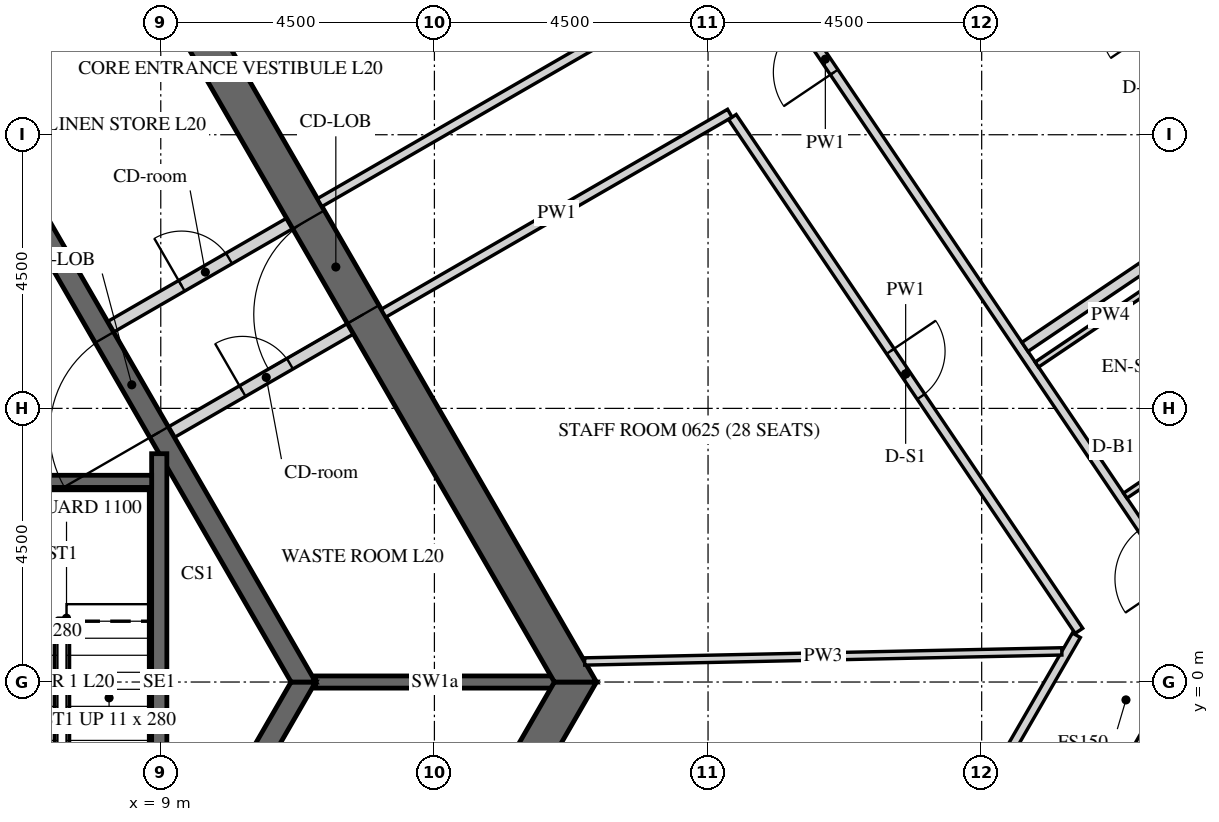
"""IFC4 building model, lengths in metres.
Left out: names, types, materials, properties, quantities, classifications, styles, units other than length and angle.
Written with IfcOpenShell. Run it as: python <this file> out.ifc"""

import sys

from ifc_helpers import new_model, si_unit, direction, frame, frame_2d, origin, place, context, subcontext, project, spatial, polyline, rectangle, outline, extrude, element, fill, save


model = new_model("IFC4")
c1 = context("Model", 3, precision=1e-05, world=origin(), true_north=direction((0.0, 1.0)))
c2 = subcontext(c1, "Body", "Model", "MODEL_VIEW")
j1 = project(units=[si_unit("LENGTHUNIT", "METRE"), si_unit("PLANEANGLEUNIT", "RADIAN")], contexts=[c1])
p1 = place(None, origin())
s1 = spatial("IfcSite", under=j1, at=p1, CompositionType="ELEMENT")
p2 = place(p1, origin())
s2 = spatial("IfcBuilding", under=s1, at=p2, CompositionType="ELEMENT")
p3 = place(p2, frame((0.0, 0.0, 92.1)))
s3 = spatial("IfcBuildingStorey", under=s2, at=p3, CompositionType="ELEMENT", Elevation=92.1)
p4 = place(p3, frame((18.83, -26.835, -0.15), z_axis=(0.0, 0.0, 1.0), x_axis=(0.500003800416, 0.866023209602, 0.0)))
e1 = element("IfcWall", 1, at=p4, inside=s3, PredefinedType="SOLIDWALL", context=c2, shape_type="SweptSolid", body=[
    extrude(outline(polyline([(-0.022, -0.275), (30.097, -0.275), (30.045, 0.275), (0.022, 0.275), (-0.022, -0.275)])), origin(), (0.0, 0.0, 1.0), 3.9),
])
p5 = place(p4, frame((1.236, 0.0, 1.05)))
e2 = element("IfcOpeningElement", 2, at=p5, cuts=e1, PredefinedType="OPENING", context=c2, shape_type="SweptSolid", body=[
    extrude(rectangle(XDim=2.4, YDim=2.4, at=frame_2d((1.2, 1.2))), frame((0.0, 0.285, 0.0), z_axis=(0.0, -1.0, 0.0), x_axis=(1.0, 0.0, 0.0)), (0.0, 0.0, 1.0), 0.57),
])
p6 = place(p4, frame((4.835, 0.0, 1.05)))
e3 = element("IfcOpeningElement", 3, at=p6, cuts=e1, PredefinedType="OPENING", context=c2, shape_type="SweptSolid", body=[
    extrude(rectangle(XDim=2.4, YDim=2.4, at=frame_2d((1.2, 1.2))), frame((0.0, 0.285, 0.0), z_axis=(0.0, -1.0, 0.0), x_axis=(1.0, 0.0, 0.0)), (0.0, 0.0, 1.0), 0.57),
])
p7 = place(p4, frame((8.436, 0.0, 1.05)))
e4 = element("IfcOpeningElement", 4, at=p7, cuts=e1, PredefinedType="OPENING", context=c2, shape_type="SweptSolid", body=[
    extrude(rectangle(XDim=2.4, YDim=2.4, at=frame_2d((1.2, 1.2))), frame((0.0, 0.285, 0.0), z_axis=(0.0, -1.0, 0.0), x_axis=(1.0, 0.0, 0.0)), (0.0, 0.0, 1.0), 0.57),
])
p8 = place(p4, frame((12.035, 0.0, 1.05)))
e5 = element("IfcOpeningElement", 5, at=p8, cuts=e1, PredefinedType="OPENING", context=c2, shape_type="SweptSolid", body=[
    extrude(rectangle(XDim=2.4, YDim=2.4, at=frame_2d((1.2, 1.2))), frame((0.0, 0.285, 0.0), z_axis=(0.0, -1.0, 0.0), x_axis=(1.0, 0.0, 0.0)), (0.0, 0.0, 1.0), 0.57),
])
p9 = place(p4, frame((15.635, 0.0, 1.05)))
e6 = element("IfcOpeningElement", 6, at=p9, cuts=e1, PredefinedType="OPENING", context=c2, shape_type="SweptSolid", body=[
    extrude(rectangle(XDim=2.4, YDim=2.4, at=frame_2d((1.2, 1.2))), frame((0.0, 0.285, 0.0), z_axis=(0.0, -1.0, 0.0), x_axis=(1.0, 0.0, 0.0)), (0.0, 0.0, 1.0), 0.57),
])
p10 = place(p4, frame((19.236, 0.0, 1.05)))
e7 = element("IfcOpeningElement", 7, at=p10, cuts=e1, PredefinedType="OPENING", context=c2, shape_type="SweptSolid", body=[
    extrude(rectangle(XDim=2.4, YDim=2.4, at=frame_2d((1.2, 1.2))), frame((0.0, 0.285, 0.0), z_axis=(0.0, -1.0, 0.0), x_axis=(1.0, 0.0, 0.0)), (0.0, 0.0, 1.0), 0.57),
])
p11 = place(p4, frame((22.835, 0.0, 1.05)))
e8 = element("IfcOpeningElement", 8, at=p11, cuts=e1, PredefinedType="OPENING", context=c2, shape_type="SweptSolid", body=[
    extrude(rectangle(XDim=2.4, YDim=2.4, at=frame_2d((1.2, 1.2))), frame((0.0, 0.285, 0.0), z_axis=(0.0, -1.0, 0.0), x_axis=(1.0, 0.0, 0.0)), (0.0, 0.0, 1.0), 0.57),
])
p12 = place(p4, frame((26.436, 0.0, 1.05)))
e9 = element("IfcOpeningElement", 9, at=p12, cuts=e1, PredefinedType="OPENING", context=c2, shape_type="SweptSolid", body=[
    extrude(rectangle(XDim=2.4, YDim=2.4, at=frame_2d((1.2, 1.2))), frame((0.0, 0.285, 0.0), z_axis=(0.0, -1.0, 0.0), x_axis=(1.0, 0.0, 0.0)), (0.0, 0.0, 1.0), 0.57),
])
p13 = place(p3, frame((33.728, 3.153, -0.15), z_axis=(0.0, 0.0, 1.0), x_axis=(-0.559192411416, 0.82903790445, 0.0)))
e10 = element("IfcWall", 10, at=p13, inside=s3, PredefinedType="SOLIDWALL", context=c2, shape_type="SweptSolid", body=[
    extrude(outline(polyline([(-0.026, -0.275), (30.093, -0.275), (30.048, 0.275), (0.026, 0.275), (-0.026, -0.275)])), origin(), (0.0, 0.0, 1.0), 3.9),
])
p14 = place(p13, frame((1.236, 0.0, 1.05)))
e11 = element("IfcOpeningElement", 11, at=p14, cuts=e10, PredefinedType="OPENING", context=c2, shape_type="SweptSolid", body=[
    extrude(rectangle(XDim=2.4, YDim=2.4, at=frame_2d((1.2, 1.2))), frame((0.0, 0.285, 0.0), z_axis=(0.0, -1.0, 0.0), x_axis=(1.0, 0.0, 0.0)), (0.0, 0.0, 1.0), 0.57),
])
p15 = place(p13, frame((4.835, 0.0, 1.05)))
e12 = element("IfcOpeningElement", 12, at=p15, cuts=e10, PredefinedType="OPENING", context=c2, shape_type="SweptSolid", body=[
    extrude(rectangle(XDim=2.4, YDim=2.4, at=frame_2d((1.2, 1.2))), frame((0.0, 0.285, 0.0), z_axis=(0.0, -1.0, 0.0), x_axis=(1.0, 0.0, 0.0)), (0.0, 0.0, 1.0), 0.57),
])
p16 = place(p13, frame((8.436, 0.0, 1.05)))
e13 = element("IfcOpeningElement", 13, at=p16, cuts=e10, PredefinedType="OPENING", context=c2, shape_type="SweptSolid", body=[
    extrude(rectangle(XDim=2.4, YDim=2.4, at=frame_2d((1.2, 1.2))), frame((0.0, 0.285, 0.0), z_axis=(0.0, -1.0, 0.0), x_axis=(1.0, 0.0, 0.0)), (0.0, 0.0, 1.0), 0.57),
])
p17 = place(p13, frame((12.035, 0.0, 1.05)))
e14 = element("IfcOpeningElement", 14, at=p17, cuts=e10, PredefinedType="OPENING", context=c2, shape_type="SweptSolid", body=[
    extrude(rectangle(XDim=2.4, YDim=2.4, at=frame_2d((1.2, 1.2))), frame((0.0, 0.285, 0.0), z_axis=(0.0, -1.0, 0.0), x_axis=(1.0, 0.0, 0.0)), (0.0, 0.0, 1.0), 0.57),
])
p18 = place(p13, frame((15.635, 0.0, 1.05)))
e15 = element("IfcOpeningElement", 15, at=p18, cuts=e10, PredefinedType="OPENING", context=c2, shape_type="SweptSolid", body=[
    extrude(rectangle(XDim=2.4, YDim=2.4, at=frame_2d((1.2, 1.2))), frame((0.0, 0.285, 0.0), z_axis=(0.0, -1.0, 0.0), x_axis=(1.0, 0.0, 0.0)), (0.0, 0.0, 1.0), 0.57),
])
p19 = place(p13, frame((19.236, 0.0, 1.05)))
e16 = element("IfcOpeningElement", 16, at=p19, cuts=e10, PredefinedType="OPENING", context=c2, shape_type="SweptSolid", body=[
    extrude(rectangle(XDim=2.4, YDim=2.4, at=frame_2d((1.2, 1.2))), frame((0.0, 0.285, 0.0), z_axis=(0.0, -1.0, 0.0), x_axis=(1.0, 0.0, 0.0)), (0.0, 0.0, 1.0), 0.57),
])
p20 = place(p13, frame((22.835, 0.0, 1.05)))
e17 = element("IfcOpeningElement", 17, at=p20, cuts=e10, PredefinedType="OPENING", context=c2, shape_type="SweptSolid", body=[
    extrude(rectangle(XDim=2.4, YDim=2.4, at=frame_2d((1.2, 1.2))), frame((0.0, 0.285, 0.0), z_axis=(0.0, -1.0, 0.0), x_axis=(1.0, 0.0, 0.0)), (0.0, 0.0, 1.0), 0.57),
])
p21 = place(p13, frame((26.436, 0.0, 1.05)))
e18 = element("IfcOpeningElement", 18, at=p21, cuts=e10, PredefinedType="OPENING", context=c2, shape_type="SweptSolid", body=[
    extrude(rectangle(XDim=2.4, YDim=2.4, at=frame_2d((1.2, 1.2))), frame((0.0, 0.285, 0.0), z_axis=(0.0, -1.0, 0.0), x_axis=(1.0, 0.0, 0.0)), (0.0, 0.0, 1.0), 0.57),
])
p22 = place(p3, frame((7.91, -13.7, -0.15), z_axis=(0.0, 0.0, 1.0), x_axis=(0.499999880136, 0.866025472988, 0.0)))
e19 = element("IfcWall", 19, at=p22, inside=s3, PredefinedType="SHEAR", context=c2, shape_type="SweptSolid", body=[
    extrude(outline(polyline([(-0.173, -0.3), (15.993, -0.3), (15.646, 0.3), (0.173, 0.3), (-0.173, -0.3)])), origin(), (0.0, 0.0, 1.0), 3.9),
])
p23 = place(p22, frame((7.039, 0.0, 0.15)))
e20 = element("IfcOpeningElement", 20, at=p23, cuts=e19, PredefinedType="OPENING", context=c2, shape_type="SweptSolid", body=[
    extrude(rectangle(XDim=1.8, YDim=2.4, at=frame_2d((0.9, 1.2))), frame((0.0, 0.31, 0.0), z_axis=(0.0, -1.0, 0.0), x_axis=(1.0, 0.0, 0.0)), (0.0, 0.0, 1.0), 0.62),
])
p24 = place(p3, frame((15.819, 0.0, -0.15), z_axis=(0.0, 0.0, 1.0), x_axis=(-0.499999880136, 0.866025472988, 0.0)))
e21 = element("IfcWall", 21, at=p24, inside=s3, PredefinedType="SHEAR", context=c2, shape_type="SweptSolid", body=[
    extrude(outline(polyline([(-0.173, -0.3), (15.993, -0.3), (15.646, 0.3), (0.173, 0.3), (-0.173, -0.3)])), origin(), (0.0, 0.0, 1.0), 3.9),
])
p25 = place(p24, frame((6.981, 0.0, 0.15)))
e22 = element("IfcOpeningElement", 22, at=p25, cuts=e21, PredefinedType="OPENING", context=c2, shape_type="SweptSolid", body=[
    extrude(rectangle(XDim=1.8, YDim=2.4, at=frame_2d((0.9, 1.2))), frame((0.0, 0.31, 0.0), z_axis=(0.0, -1.0, 0.0), x_axis=(1.0, 0.0, 0.0)), (0.0, 0.0, 1.0), 0.62),
])
p26 = place(p3, frame((5.673, -9.825, -0.15), z_axis=(0.0, 0.0, 1.0), x_axis=(0.499995046907, 0.866028263435, 0.0)))
e23 = element("IfcWall", 23, at=p26, inside=s3, PredefinedType="SHEAR", context=c2, shape_type="SweptSolid", body=[
    extrude(outline(polyline([(-0.101, -0.175), (11.446, -0.175), (11.244, 0.175), (0.101, 0.175), (-0.101, -0.175)])), origin(), (0.0, 0.0, 1.0), 3.9),
])
p27 = place(p26, frame((4.801, 0.0, 0.15)))
e24 = element("IfcOpeningElement", 24, at=p27, cuts=e23, PredefinedType="OPENING", context=c2, shape_type="SweptSolid", body=[
    extrude(rectangle(XDim=1.8, YDim=2.4, at=frame_2d((0.9, 1.2))), frame((0.0, 0.185, 0.0), z_axis=(0.0, -1.0, 0.0), x_axis=(1.0, 0.0, 0.0)), (0.0, 0.0, 1.0), 0.37),
])
p28 = place(p3, frame((11.345, 0.0, -0.15), z_axis=(0.0, 0.0, 1.0), x_axis=(-0.499995046907, 0.866028263435, 0.0)))
e25 = element("IfcWall", 25, at=p28, inside=s3, PredefinedType="SHEAR", context=c2, shape_type="SweptSolid", body=[
    extrude(outline(polyline([(-0.101, -0.175), (11.446, -0.175), (11.244, 0.175), (0.101, 0.175), (-0.101, -0.175)])), origin(), (0.0, 0.0, 1.0), 3.9),
])
p29 = place(p28, frame((4.744, 0.0, 0.15)))
e26 = element("IfcOpeningElement", 26, at=p29, cuts=e25, PredefinedType="OPENING", context=c2, shape_type="SweptSolid", body=[
    extrude(rectangle(XDim=1.8, YDim=2.4, at=frame_2d((0.9, 1.2))), frame((0.0, 0.185, 0.0), z_axis=(0.0, -1.0, 0.0), x_axis=(1.0, 0.0, 0.0)), (0.0, 0.0, 1.0), 0.37),
])
p30 = place(p3, frame((11.547, 0.0, -0.15), z_axis=(0.0, 0.0, 1.0), x_axis=(1.0, 0.0, 0.0)))
e27 = element("IfcWall", 27, at=p30, inside=s3, PredefinedType="SHEAR", context=c2, shape_type="SweptSolid", body=[
    extrude(rectangle(XDim=3.926, YDim=0.2, at=frame_2d((1.963, 0.0))), origin(), (0.0, 0.0, 1.0), 3.9),
])
p31 = place(p3, frame((5.773, 10.0, -0.15), z_axis=(0.0, 0.0, 1.0), x_axis=(0.500038251005, 0.86600331843, 0.0)))
e28 = element("IfcWall", 28, at=p31, inside=s3, PredefinedType="SHEAR", context=c2, shape_type="SweptSolid", body=[
    extrude(rectangle(XDim=3.926, YDim=0.2, at=frame_2d((1.963, 0.0))), origin(), (0.0, 0.0, 1.0), 3.9),
])
p32 = place(p3, frame((8.175, 5.841, 0.0), z_axis=(0.0, 0.0, 1.0), x_axis=(0.866020560687, 0.500008388397, 0.0)))
e29 = element("IfcWall", 29, at=p32, inside=s3, PredefinedType="PARTITIONING", context=c2, shape_type="SweptSolid", body=[
    extrude(rectangle(XDim=3.4, YDim=0.2, at=frame_2d((1.7, 0.0))), origin(), (0.0, 0.0, 1.0), 3.65),
])
p33 = place(p32, frame((1.35, 0.0, 0.0)))
e30 = element("IfcOpeningElement", 30, at=p33, cuts=e29, PredefinedType="OPENING", context=c2, shape_type="SweptSolid", body=[
    extrude(rectangle(XDim=0.9, YDim=2.1, at=frame_2d((0.45, 1.05))), frame((0.0, 0.11, 0.0), z_axis=(0.0, -1.0, 0.0), x_axis=(1.0, 0.0, 0.0)), (0.0, 0.0, 1.0), 0.22),
])
p34 = place(p3, frame((9.175, 4.109, 0.0), z_axis=(0.0, 0.0, 1.0), x_axis=(0.865989465428, 0.500062241894, 0.0)))
e31 = element("IfcWall", 31, at=p34, inside=s3, PredefinedType="PARTITIONING", context=c2, shape_type="SweptSolid", body=[
    extrude(rectangle(XDim=3.4, YDim=0.2, at=frame_2d((1.7, 0.0))), origin(), (0.0, 0.0, 1.0), 3.65),
])
p35 = place(p34, frame((1.351, 0.0, 0.0)))
e32 = element("IfcOpeningElement", 32, at=p35, cuts=e31, PredefinedType="OPENING", context=c2, shape_type="SweptSolid", body=[
    extrude(rectangle(XDim=0.9, YDim=2.1, at=frame_2d((0.45, 1.05))), frame((0.0, 0.11, 0.0), z_axis=(0.0, -1.0, 0.0), x_axis=(1.0, 0.0, 0.0)), (0.0, 0.0, 1.0), 0.22),
])
p36 = place(p3, frame((8.975, -3.755, -0.25), z_axis=(0.0, 0.0, 1.0), x_axis=(0.0, 1.0, 0.0)))
e33 = element("IfcWall", 33, at=p36, inside=s3, PredefinedType="SHEAR", context=c2, shape_type="SweptSolid", body=[
    extrude(rectangle(XDim=7.51, YDim=0.25, at=frame_2d((3.755, 0.0))), origin(), (0.0, 0.0, 1.0), 3.9),
])
p37 = place(p3, frame((5.9, 3.3, -0.25), z_axis=(0.0, 0.0, 1.0), x_axis=(1.0, 0.0, 0.0)))
e34 = element("IfcWall", 34, at=p37, inside=s3, PredefinedType="SHEAR", context=c2, shape_type="SweptSolid", body=[
    extrude(rectangle(XDim=2.95, YDim=0.2, at=frame_2d((1.475, 0.0))), origin(), (0.0, 0.0, 1.0), 3.9),
])
p38 = place(p3, frame((14.102, -20.075, 0.0), z_axis=(0.0, 0.0, 1.0), x_axis=(0.499996816197, 0.866027241946, 0.0)))
e35 = element("IfcWall", 35, at=p38, inside=s3, PredefinedType="PARTITIONING", context=c2, shape_type="SweptSolid", body=[
    extrude(rectangle(XDim=24.238, YDim=0.15, at=frame_2d((12.119, 0.0))), origin(), (0.0, 0.0, 1.0), 2.988),
])
p39 = place(p38, frame((4.729, 0.0, 0.0)))
e36 = element("IfcOpeningElement", 36, at=p39, cuts=e35, PredefinedType="OPENING", context=c2, shape_type="SweptSolid", body=[
    extrude(rectangle(XDim=1.0, YDim=2.1, at=frame_2d((0.5, 1.05))), frame((0.0, 0.085, 0.0), z_axis=(0.0, -1.0, 0.0), x_axis=(1.0, 0.0, 0.0)), (0.0, 0.0, 1.0), 0.17),
])
p40 = place(p38, frame((13.446, 0.0, 0.0)))
e37 = element("IfcOpeningElement", 37, at=p40, cuts=e35, PredefinedType="OPENING", context=c2, shape_type="SweptSolid", body=[
    extrude(rectangle(XDim=1.0, YDim=2.1, at=frame_2d((0.5, 1.05))), frame((0.0, 0.085, 0.0), z_axis=(0.0, -1.0, 0.0), x_axis=(1.0, 0.0, 0.0)), (0.0, 0.0, 1.0), 0.17),
])
p41 = place(p3, frame((26.174, 0.985, 0.0), z_axis=(0.0, 0.0, 1.0), x_axis=(-0.559199676409, 0.82903300411, 0.0)))
e38 = element("IfcWall", 38, at=p41, inside=s3, PredefinedType="PARTITIONING", context=c2, shape_type="SweptSolid", body=[
    extrude(rectangle(XDim=22.335, YDim=0.15, at=frame_2d((11.168, 0.0))), origin(), (0.0, 0.0, 1.0), 2.988),
])
p42 = place(p41, frame((0.863, 0.0, 0.0)))
e39 = element("IfcOpeningElement", 39, at=p42, cuts=e38, PredefinedType="OPENING", context=c2, shape_type="SweptSolid", body=[
    extrude(rectangle(XDim=1.0, YDim=2.1, at=frame_2d((0.5, 1.05))), frame((0.0, 0.085, 0.0), z_axis=(0.0, -1.0, 0.0), x_axis=(1.0, 0.0, 0.0)), (0.0, 0.0, 1.0), 0.17),
])
p43 = place(p41, frame((10.909, 0.0, 0.0)))
e40 = element("IfcOpeningElement", 40, at=p43, cuts=e38, PredefinedType="OPENING", context=c2, shape_type="SweptSolid", body=[
    extrude(rectangle(XDim=1.0, YDim=2.1, at=frame_2d((0.5, 1.05))), frame((0.0, 0.085, 0.0), z_axis=(0.0, -1.0, 0.0), x_axis=(1.0, 0.0, 0.0)), (0.0, 0.0, 1.0), 0.17),
])
p44 = place(p3, frame((24.058, 0.769, 0.0), z_axis=(0.0, 0.0, 1.0), x_axis=(-0.499995346943, -0.866028090212, 0.0)))
e41 = element("IfcWall", 41, at=p44, inside=s3, PredefinedType="PARTITIONING", context=c2, shape_type="SweptSolid", body=[
    extrude(rectangle(XDim=11.616, YDim=0.15, at=frame_2d((5.808, 0.0))), origin(), (0.0, 0.0, 1.0), 2.988),
])
p45 = place(p44, frame((5.358, 0.0, 0.0)))
e42 = element("IfcOpeningElement", 42, at=p45, cuts=e41, PredefinedType="OPENING", context=c2, shape_type="SweptSolid", body=[
    extrude(rectangle(XDim=0.9, YDim=2.1, at=frame_2d((0.45, 1.05))), frame((0.0, 0.085, 0.0), z_axis=(0.0, -1.0, 0.0), x_axis=(1.0, 0.0, 0.0)), (0.0, 0.0, 1.0), 0.17),
])
p46 = place(p3, frame((12.664, 6.066, 0.0), z_axis=(0.0, 0.0, 1.0), x_axis=(0.866027295802, 0.499996722915, 0.0)))
e43 = element("IfcWall", 43, at=p46, inside=s3, PredefinedType="PARTITIONING", context=c2, shape_type="SweptSolid", body=[
    extrude(rectangle(XDim=6.575, YDim=0.15, at=frame_2d((3.288, 0.0))), origin(), (0.0, 0.0, 1.0), 2.988),
])
p47 = place(p3, frame((18.4, 9.291, 0.0), z_axis=(0.0, 0.0, 1.0), x_axis=(0.559191829043, -0.829038297265, 0.0)))
e44 = element("IfcWall", 44, at=p47, inside=s3, PredefinedType="PARTITIONING", context=c2, shape_type="SweptSolid", body=[
    extrude(rectangle(XDim=10.192, YDim=0.15, at=frame_2d((5.096, 0.0))), origin(), (0.0, 0.0, 1.0), 2.988),
])
p48 = place(p47, frame((4.646, 0.0, 0.0)))
e45 = element("IfcOpeningElement", 45, at=p48, cuts=e44, PredefinedType="OPENING", context=c2, shape_type="SweptSolid", body=[
    extrude(rectangle(XDim=0.9, YDim=2.1, at=frame_2d((0.45, 1.05))), frame((0.0, 0.085, 0.0), z_axis=(0.0, -1.0, 0.0), x_axis=(1.0, 0.0, 0.0)), (0.0, 0.0, 1.0), 0.17),
])
p49 = place(p3, frame((17.116, 11.061, 0.0), z_axis=(0.0, 0.0, 1.0), x_axis=(-0.866021127751, -0.500007406234, 0.0)))
e46 = element("IfcWall", 46, at=p49, inside=s3, PredefinedType="PARTITIONING", context=c2, shape_type="SweptSolid", body=[
    extrude(rectangle(XDim=6.354, YDim=0.15, at=frame_2d((3.177, 0.0))), origin(), (0.0, 0.0, 1.0), 2.988),
])
p50 = place(p3, frame((23.407, 5.221, 0.0), z_axis=(0.0, 0.0, 1.0), x_axis=(0.829007334469, 0.559237730663, 0.0)))
e47 = element("IfcWall", 47, at=p50, inside=s3, PredefinedType="PARTITIONING", context=c2, shape_type="SweptSolid", body=[
    extrude(rectangle(XDim=2.925, YDim=0.1, at=frame_2d((1.462, 0.0))), origin(), (0.0, 0.0, 1.0), 2.988),
])
p51 = place(p3, frame((27.245, 4.673, 0.0), z_axis=(0.0, 0.0, 1.0), x_axis=(-0.82904649496, -0.559179675234, 0.0)))
e48 = element("IfcWall", 48, at=p51, inside=s3, PredefinedType="PARTITIONING", context=c2, shape_type="SweptSolid", body=[
    extrude(rectangle(XDim=2.875, YDim=0.1, at=frame_2d((1.438, 0.0))), origin(), (0.0, 0.0, 1.0), 2.988),
])
p52 = place(p51, frame((1.05, 0.0, 0.0)))
e49 = element("IfcOpeningElement", 49, at=p52, cuts=e48, PredefinedType="OPENING", context=c2, shape_type="SweptSolid", body=[
    extrude(rectangle(XDim=0.8, YDim=2.1, at=frame_2d((0.4, 1.05))), frame((0.0, 0.06, 0.0), z_axis=(0.0, -1.0, 0.0), x_axis=(1.0, 0.0, 0.0)), (0.0, 0.0, 1.0), 0.12),
])
p53 = place(p3, frame((29.119, 9.495, 0.0), z_axis=(0.0, 0.0, 1.0), x_axis=(-0.82903334026, -0.559199178055, 0.0)))
e50 = element("IfcWall", 50, at=p53, inside=s3, PredefinedType="PARTITIONING", context=c2, shape_type="SweptSolid", body=[
    extrude(rectangle(XDim=7.125, YDim=0.18, at=frame_2d((3.562, 0.0))), origin(), (0.0, 0.0, 1.0), 2.988),
])
p54 = place(p3, frame((27.079, 8.228, 0.0), z_axis=(0.0, 0.0, 1.0), x_axis=(-0.559200948469, 0.829032146078, 0.0)))
e51 = element("IfcWall", 51, at=p54, inside=s3, PredefinedType="PARTITIONING", context=c2, shape_type="SweptSolid", body=[
    extrude(rectangle(XDim=7.11, YDim=0.1, at=frame_2d((3.555, 0.0))), origin(), (0.0, 0.0, 1.0), 2.988),
])
p55 = place(p54, frame((3.06, 0.0, 0.0)))
e52 = element("IfcOpeningElement", 52, at=p55, cuts=e51, PredefinedType="OPENING", context=c2, shape_type="SweptSolid", body=[
    extrude(rectangle(XDim=0.9, YDim=2.1, at=frame_2d((0.45, 1.05))), frame((0.0, 0.06, 0.0), z_axis=(0.0, -1.0, 0.0), x_axis=(1.0, 0.0, 0.0)), (0.0, 0.0, 1.0), 0.12),
])
p56 = place(p3, frame((23.818, 0.504, 0.0), z_axis=(0.0, 0.0, 1.0), x_axis=(-0.999776284395, -0.021151386765, 0.0)))
e53 = element("IfcWall", 53, at=p56, inside=s3, PredefinedType="PARTITIONING", context=c2, shape_type="SweptSolid", body=[
    extrude(rectangle(XDim=7.849, YDim=0.12, at=frame_2d((3.924, 0.0))), origin(), (0.0, 0.0, 1.0), 2.988),
])
p57 = place(p25, origin())
e54 = element("IfcDoor", 54, at=p57, inside=s3, OperationType="DOUBLE_DOOR_SINGLE_SWING", PredefinedType="DOOR", context=c2, shape_type="SweptSolid", body=[
    extrude(rectangle(XDim=1.8, YDim=2.4, at=frame_2d((0.9, 1.2))), frame((0.0, 0.025, 0.0), z_axis=(0.0, -1.0, 0.0), x_axis=(1.0, 0.0, 0.0)), (0.0, 0.0, 1.0), 0.05),
])
fill(e22, e54)
p58 = place(p29, origin())
e55 = element("IfcDoor", 55, at=p58, inside=s3, OperationType="DOUBLE_DOOR_SINGLE_SWING", PredefinedType="DOOR", context=c2, shape_type="SweptSolid", body=[
    extrude(rectangle(XDim=1.8, YDim=2.4, at=frame_2d((0.9, 1.2))), frame((0.0, 0.025, 0.0), z_axis=(0.0, -1.0, 0.0), x_axis=(1.0, 0.0, 0.0)), (0.0, 0.0, 1.0), 0.05),
])
fill(e26, e55)
p59 = place(p33, origin())
e56 = element("IfcDoor", 56, at=p59, inside=s3, OperationType="SINGLE_SWING_LEFT", PredefinedType="DOOR", context=c2, shape_type="SweptSolid", body=[
    extrude(rectangle(XDim=0.9, YDim=2.1, at=frame_2d((0.45, 1.05))), frame((0.0, 0.025, 0.0), z_axis=(0.0, -1.0, 0.0), x_axis=(1.0, 0.0, 0.0)), (0.0, 0.0, 1.0), 0.05),
])
fill(e30, e56)
p60 = place(p35, origin())
e57 = element("IfcDoor", 57, at=p60, inside=s3, OperationType="SINGLE_SWING_LEFT", PredefinedType="DOOR", context=c2, shape_type="SweptSolid", body=[
    extrude(rectangle(XDim=0.9, YDim=2.1, at=frame_2d((0.45, 1.05))), frame((0.0, 0.025, 0.0), z_axis=(0.0, -1.0, 0.0), x_axis=(1.0, 0.0, 0.0)), (0.0, 0.0, 1.0), 0.05),
])
fill(e32, e57)
p61 = place(p43, origin())
e58 = element("IfcDoor", 58, at=p61, inside=s3, OperationType="SINGLE_SWING_RIGHT", PredefinedType="DOOR", context=c2, shape_type="SweptSolid", body=[
    extrude(rectangle(XDim=1.0, YDim=2.1, at=frame_2d((0.5, 1.05))), frame((0.0, 0.025, 0.0), z_axis=(0.0, -1.0, 0.0), x_axis=(1.0, 0.0, 0.0)), (0.0, 0.0, 1.0), 0.05),
])
fill(e40, e58)
p62 = place(p48, origin())
e59 = element("IfcDoor", 59, at=p62, inside=s3, OperationType="SINGLE_SWING_RIGHT", PredefinedType="DOOR", context=c2, shape_type="SweptSolid", body=[
    extrude(rectangle(XDim=0.9, YDim=2.1, at=frame_2d((0.45, 1.05))), frame((0.0, 0.025, 0.0), z_axis=(0.0, -1.0, 0.0), x_axis=(1.0, 0.0, 0.0)), (0.0, 0.0, 1.0), 0.05),
])
fill(e45, e59)
save(model, sys.argv[1])
